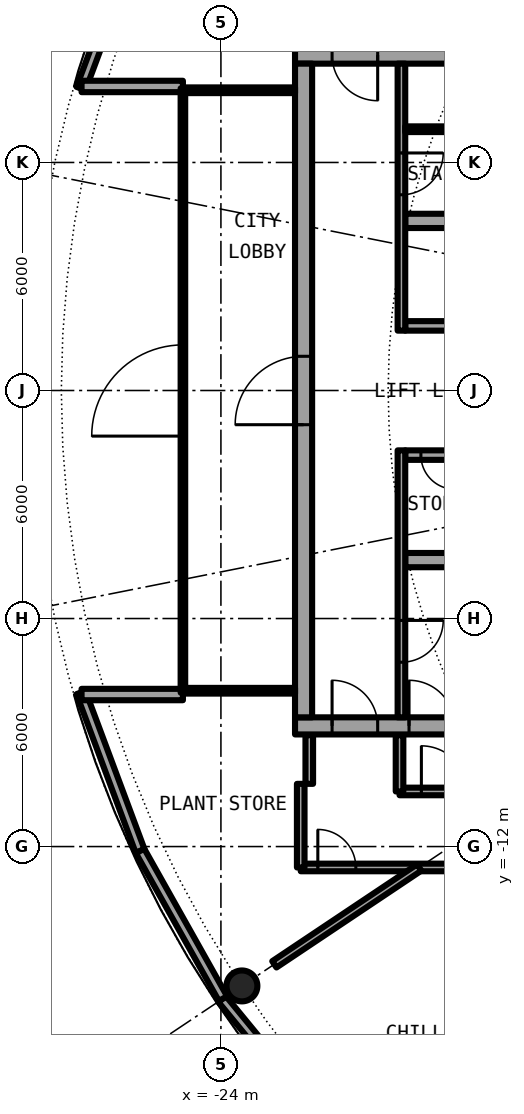
"""IFC4 building model, lengths in metres.
Left out: names, types, materials, properties, quantities, classifications, styles, units other than length and angle.
Written with IfcOpenShell. Run it as: python <this file> out.ifc"""

import sys

from ifc_helpers import new_model, si_unit, direction, frame, frame_2d, origin, origin_2d, place, context, subcontext, project, spatial, rectangle, hollow_circle, extrude, element, fill, save


model = new_model("IFC4")
c1 = context("Model", 3, precision=1e-05, world=origin(), true_north=direction((0.0, 1.0)))
c2 = subcontext(c1, "Body", "Model", "MODEL_VIEW")
j1 = project(units=[si_unit("LENGTHUNIT", "METRE"), si_unit("PLANEANGLEUNIT", "RADIAN")], contexts=[c1])
p1 = place(None, origin())
s1 = spatial("IfcSite", under=j1, at=p1, CompositionType="ELEMENT")
p2 = place(p1, origin())
s2 = spatial("IfcBuilding", under=s1, at=p2, CompositionType="ELEMENT")
p3 = place(p2, frame((0.0, 0.0, 186.0)))
s3 = spatial("IfcBuildingStorey", under=s2, at=p3, CompositionType="ELEMENT", Elevation=186.0)
p4 = place(p3, frame((-23.448, -15.667, 0.0), z_axis=(0.0, 0.0, 1.0), x_axis=(1.0, 0.0, 0.0)))
e1 = element("IfcColumn", 1, at=p4, inside=s3, PredefinedType="COLUMN", context=c2, shape_type="SweptSolid", body=[
    extrude(hollow_circle(Radius=0.406, WallThickness=0.03, at=origin_2d()), origin(), (0.0, 0.0, 1.0), 4.2),
])
p5 = place(p3, frame((-23.967, -16.014, 0.0), z_axis=(0.0, 0.0, 1.0), x_axis=(0.634403999748, -0.773001659186, 0.0)))
e2 = element("IfcWall", 2, at=p5, inside=s3, PredefinedType="SOLIDWALL", context=c2, shape_type="SweptSolid", body=[
    extrude(rectangle(XDim=5.651, YDim=0.25, at=frame_2d((2.825, 0.0))), origin(), (0.0, 0.0, 1.0), 3.85),
])
p6 = place(p3, frame((-27.682, -7.945, 0.0), z_axis=(0.0, 0.0, 1.0), x_axis=(0.349247811493, -0.937030397675, 0.0)))
e3 = element("IfcWall", 3, at=p6, inside=s3, PredefinedType="SOLIDWALL", context=c2, shape_type="SweptSolid", body=[
    extrude(rectangle(XDim=4.452, YDim=0.25, at=frame_2d((2.226, 0.0))), origin(), (0.0, 0.0, 1.0), 3.85),
])
p7 = place(p3, frame((-26.127, -12.117, 0.0), z_axis=(0.0, 0.0, 1.0), x_axis=(0.489696356642, -0.871893042919, 0.0)))
e4 = element("IfcWall", 4, at=p7, inside=s3, PredefinedType="SOLIDWALL", context=c2, shape_type="SweptSolid", body=[
    extrude(rectangle(XDim=4.454, YDim=0.25, at=frame_2d((2.227, 0.0))), origin(), (0.0, 0.0, 1.0), 3.85),
])
p8 = place(p3, frame((-26.127, 12.117, 0.0), z_axis=(0.0, 0.0, 1.0), x_axis=(-0.349247811493, -0.937030397675, 0.0)))
e5 = element("IfcWall", 5, at=p8, inside=s3, PredefinedType="SOLIDWALL", context=c2, shape_type="SweptSolid", body=[
    extrude(rectangle(XDim=4.452, YDim=0.25, at=frame_2d((2.226, 0.0))), origin(), (0.0, 0.0, 1.0), 3.85),
])
for number, where, z_axis, x_axis in (
    (6, (-25.0, 8.0, 0.0), (0.0, 0.0, 1.0), (-1.0, 0.0, 0.0)),
    (7, (-25.0, -8.0, 0.0), (0.0, 0.0, 1.0), (-1.0, 0.0, 0.0)),
):
    element("IfcWall", number, at=place(p3, frame(where, z_axis=z_axis, x_axis=x_axis)), inside=s3, PredefinedType="SOLIDWALL", context=c2, shape_type="SweptSolid", body=[
        extrude(rectangle(XDim=2.667, YDim=0.3, at=frame_2d((1.333, 0.0))), origin(), (0.0, 0.0, 1.0), 3.85),
    ])
p9 = place(p3, frame((-22.05, -8.825, 0.0), z_axis=(0.0, 0.0, 1.0), x_axis=(1.0, 0.0, 0.0)))
e8 = element("IfcWall", 8, at=p9, inside=s3, PredefinedType="SHEAR", context=c2, shape_type="SweptSolid", body=[
    extrude(rectangle(XDim=13.5, YDim=0.45, at=frame_2d((6.75, 0.0))), origin(), (0.0, 0.0, 1.0), 4.2),
])
p10 = place(p9, frame((0.975, 0.0, 0.0)))
e9 = element("IfcOpeningElement", 9, at=p10, cuts=e8, PredefinedType="OPENING", context=c2, shape_type="SweptSolid", body=[
    extrude(rectangle(XDim=1.2, YDim=2.3, at=frame_2d((0.6, 1.15))), frame((0.0, 0.235, 0.0), z_axis=(0.0, -1.0, 0.0), x_axis=(1.0, 0.0, 0.0)), (0.0, 0.0, 1.0), 0.47),
])
p11 = place(p9, frame((3.0, 0.0, 0.0)))
e10 = element("IfcOpeningElement", 10, at=p11, cuts=e8, PredefinedType="OPENING", context=c2, shape_type="SweptSolid", body=[
    extrude(rectangle(XDim=1.2, YDim=2.3, at=frame_2d((0.6, 1.15))), frame((0.0, 0.235, 0.0), z_axis=(0.0, -1.0, 0.0), x_axis=(1.0, 0.0, 0.0)), (0.0, 0.0, 1.0), 0.47),
])
p12 = place(p3, frame((-8.55, 8.825, 0.0), z_axis=(0.0, 0.0, 1.0), x_axis=(-1.0, 0.0, 0.0)))
e11 = element("IfcWall", 11, at=p12, inside=s3, PredefinedType="SHEAR", context=c2, shape_type="SweptSolid", body=[
    extrude(rectangle(XDim=13.5, YDim=0.45, at=frame_2d((6.75, 0.0))), origin(), (0.0, 0.0, 1.0), 4.2),
])
p13 = place(p12, frame((11.325, 0.0, 0.0)))
e12 = element("IfcOpeningElement", 12, at=p13, cuts=e11, PredefinedType="OPENING", context=c2, shape_type="SweptSolid", body=[
    extrude(rectangle(XDim=1.2, YDim=2.3, at=frame_2d((0.6, 1.15))), frame((0.0, 0.235, 0.0), z_axis=(0.0, -1.0, 0.0), x_axis=(1.0, 0.0, 0.0)), (0.0, 0.0, 1.0), 0.47),
])
p14 = place(p3, frame((-21.825, -8.6, 0.0), z_axis=(0.0, 0.0, 1.0), x_axis=(0.0, 1.0, 0.0)))
e13 = element("IfcWall", 13, at=p14, inside=s3, PredefinedType="SHEAR", context=c2, shape_type="SweptSolid", body=[
    extrude(rectangle(XDim=17.2, YDim=0.45, at=frame_2d((8.6, 0.0))), origin(), (0.0, 0.0, 1.0), 4.2),
])
p15 = place(p14, frame((7.7, 0.0, 0.0)))
e14 = element("IfcOpeningElement", 14, at=p15, cuts=e13, PredefinedType="OPENING", context=c2, shape_type="SweptSolid", body=[
    extrude(rectangle(XDim=1.8, YDim=2.3, at=frame_2d((0.9, 1.15))), frame((0.0, 0.235, 0.0), z_axis=(0.0, -1.0, 0.0), x_axis=(1.0, 0.0, 0.0)), (0.0, 0.0, 1.0), 0.47),
])
p16 = place(p3, frame((-9.0, -1.7, 0.0), z_axis=(0.0, 0.0, 1.0), x_axis=(-1.0, 0.0, 0.0)))
e15 = element("IfcWall", 15, at=p16, inside=s3, PredefinedType="SHEAR", context=c2, shape_type="SweptSolid", body=[
    extrude(rectangle(XDim=10.15, YDim=0.25, at=frame_2d((5.075, 0.0))), origin(), (0.0, 0.0, 1.0), 4.2),
])
p17 = place(p16, frame((0.212, 0.0, 0.0)))
e16 = element("IfcOpeningElement", 16, at=p17, cuts=e15, PredefinedType="OPENING", context=c2, shape_type="SweptSolid", body=[
    extrude(rectangle(XDim=0.9, YDim=2.3, at=frame_2d((0.45, 1.15))), frame((0.0, 0.135, 0.0), z_axis=(0.0, -1.0, 0.0), x_axis=(1.0, 0.0, 0.0)), (0.0, 0.0, 1.0), 0.27),
])
p18 = place(p16, frame((3.225, 0.0, 0.0)))
e17 = element("IfcOpeningElement", 17, at=p18, cuts=e15, PredefinedType="OPENING", context=c2, shape_type="SweptSolid", body=[
    extrude(rectangle(XDim=0.9, YDim=2.3, at=frame_2d((0.45, 1.15))), frame((0.0, 0.135, 0.0), z_axis=(0.0, -1.0, 0.0), x_axis=(1.0, 0.0, 0.0)), (0.0, 0.0, 1.0), 0.27),
])
p19 = place(p16, frame((8.837, 0.0, 0.0)))
e18 = element("IfcOpeningElement", 18, at=p19, cuts=e15, PredefinedType="OPENING", context=c2, shape_type="SweptSolid", body=[
    extrude(rectangle(XDim=0.9, YDim=2.3, at=frame_2d((0.45, 1.15))), frame((0.0, 0.135, 0.0), z_axis=(0.0, -1.0, 0.0), x_axis=(1.0, 0.0, 0.0)), (0.0, 0.0, 1.0), 0.27),
])
p20 = place(p3, frame((-9.0, -4.462, 0.0), z_axis=(0.0, 0.0, 1.0), x_axis=(-1.0, 0.0, 0.0)))
e19 = element("IfcWall", 19, at=p20, inside=s3, PredefinedType="SHEAR", context=c2, shape_type="SweptSolid", body=[
    extrude(rectangle(XDim=10.15, YDim=0.375, at=frame_2d((5.075, 0.0))), origin(), (0.0, 0.0, 1.0), 4.2),
])
p21 = place(p20, frame((6.6, 0.0, 0.0)))
e20 = element("IfcOpeningElement", 20, at=p21, cuts=e19, PredefinedType="OPENING", context=c2, shape_type="SweptSolid", body=[
    extrude(rectangle(XDim=1.1, YDim=2.3, at=frame_2d((0.55, 1.15))), frame((0.0, 0.198, 0.0), z_axis=(0.0, -1.0, 0.0), x_axis=(1.0, 0.0, 0.0)), (0.0, 0.0, 1.0), 0.395),
])
p22 = place(p3, frame((-19.25, -1.575, 0.0), z_axis=(0.0, 0.0, 1.0), x_axis=(0.0, -1.0, 0.0)))
e21 = element("IfcWall", 21, at=p22, inside=s3, PredefinedType="SOLIDWALL", context=c2, shape_type="SweptSolid", body=[
    extrude(rectangle(XDim=7.025, YDim=0.2, at=frame_2d((3.513, 0.0))), origin(), (0.0, 0.0, 1.0), 3.85),
])
p23 = place(p22, frame((4.475, 0.0, 0.0)))
e22 = element("IfcOpeningElement", 22, at=p23, cuts=e21, PredefinedType="OPENING", context=c2, shape_type="SweptSolid", body=[
    extrude(rectangle(XDim=1.1, YDim=2.3, at=frame_2d((0.55, 1.15))), frame((0.0, 0.11, 0.0), z_axis=(0.0, -1.0, 0.0), x_axis=(1.0, 0.0, 0.0)), (0.0, 0.0, 1.0), 0.22),
])
p24 = place(p3, frame((-9.0, 1.7, 0.0), z_axis=(0.0, 0.0, 1.0), x_axis=(-1.0, 0.0, 0.0)))
e23 = element("IfcWall", 23, at=p24, inside=s3, PredefinedType="SHEAR", context=c2, shape_type="SweptSolid", body=[
    extrude(rectangle(XDim=10.15, YDim=0.25, at=frame_2d((5.075, 0.0))), origin(), (0.0, 0.0, 1.0), 4.2),
])
p25 = place(p24, frame((0.387, 0.0, 0.0)))
e24 = element("IfcOpeningElement", 24, at=p25, cuts=e23, PredefinedType="OPENING", context=c2, shape_type="SweptSolid", body=[
    extrude(rectangle(XDim=1.1, YDim=2.3, at=frame_2d((0.55, 1.15))), frame((0.0, 0.135, 0.0), z_axis=(0.0, -1.0, 0.0), x_axis=(1.0, 0.0, 0.0)), (0.0, 0.0, 1.0), 0.27),
])
p26 = place(p24, frame((2.45, 0.0, 0.0)))
e25 = element("IfcOpeningElement", 25, at=p26, cuts=e23, PredefinedType="OPENING", context=c2, shape_type="SweptSolid", body=[
    extrude(rectangle(XDim=1.1, YDim=2.3, at=frame_2d((0.55, 1.15))), frame((0.0, 0.135, 0.0), z_axis=(0.0, -1.0, 0.0), x_axis=(1.0, 0.0, 0.0)), (0.0, 0.0, 1.0), 0.27),
])
p27 = place(p24, frame((4.45, 0.0, 0.0)))
e26 = element("IfcOpeningElement", 26, at=p27, cuts=e23, PredefinedType="OPENING", context=c2, shape_type="SweptSolid", body=[
    extrude(rectangle(XDim=1.1, YDim=2.3, at=frame_2d((0.55, 1.15))), frame((0.0, 0.135, 0.0), z_axis=(0.0, -1.0, 0.0), x_axis=(1.0, 0.0, 0.0)), (0.0, 0.0, 1.0), 0.27),
])
p28 = place(p24, frame((6.6, 0.0, 0.0)))
e27 = element("IfcOpeningElement", 27, at=p28, cuts=e23, PredefinedType="OPENING", context=c2, shape_type="SweptSolid", body=[
    extrude(rectangle(XDim=1.1, YDim=2.3, at=frame_2d((0.55, 1.15))), frame((0.0, 0.135, 0.0), z_axis=(0.0, -1.0, 0.0), x_axis=(1.0, 0.0, 0.0)), (0.0, 0.0, 1.0), 0.27),
])
p29 = place(p3, frame((-9.0, 4.462, 0.0), z_axis=(0.0, 0.0, 1.0), x_axis=(-1.0, 0.0, 0.0)))
e28 = element("IfcWall", 28, at=p29, inside=s3, PredefinedType="SHEAR", context=c2, shape_type="SweptSolid", body=[
    extrude(rectangle(XDim=10.15, YDim=0.375, at=frame_2d((5.075, 0.0))), origin(), (0.0, 0.0, 1.0), 4.2),
])
p30 = place(p3, frame((-19.25, 8.6, 0.0), z_axis=(0.0, 0.0, 1.0), x_axis=(0.0, -1.0, 0.0)))
e29 = element("IfcWall", 29, at=p30, inside=s3, PredefinedType="SOLIDWALL", context=c2, shape_type="SweptSolid", body=[
    extrude(rectangle(XDim=7.025, YDim=0.2, at=frame_2d((3.513, 0.0))), origin(), (0.0, 0.0, 1.0), 3.85),
])
p31 = place(p30, frame((2.35, 0.0, 0.0)))
e30 = element("IfcOpeningElement", 30, at=p31, cuts=e29, PredefinedType="OPENING", context=c2, shape_type="SweptSolid", body=[
    extrude(rectangle(XDim=1.1, YDim=2.3, at=frame_2d((0.55, 1.15))), frame((0.0, 0.11, 0.0), z_axis=(0.0, -1.0, 0.0), x_axis=(1.0, 0.0, 0.0)), (0.0, 0.0, 1.0), 0.22),
])
p32 = place(p3, frame((-15.45, 6.875, 0.0), z_axis=(0.0, 0.0, 1.0), x_axis=(-1.0, 0.0, 0.0)))
e31 = element("IfcWall", 31, at=p32, inside=s3, PredefinedType="PARTITIONING", context=c2, shape_type="SweptSolid", body=[
    extrude(rectangle(XDim=3.7, YDim=0.15, at=frame_2d((1.85, 0.0))), origin(), (0.0, 0.0, 1.0), 3.85),
])
p33 = place(p32, frame((1.4, 0.0, 0.0)))
e32 = element("IfcOpeningElement", 32, at=p33, cuts=e31, PredefinedType="OPENING", context=c2, shape_type="SweptSolid", body=[
    extrude(rectangle(XDim=0.9, YDim=2.3, at=frame_2d((0.45, 1.15))), frame((0.0, 0.085, 0.0), z_axis=(0.0, -1.0, 0.0), x_axis=(1.0, 0.0, 0.0)), (0.0, 0.0, 1.0), 0.17),
])
for number, where, z_axis, x_axis in (
    (33, (-22.05, 7.9, 0.0), (0.0, 0.0, 1.0), (-1.0, 0.0, 0.0)),
    (34, (-22.05, -7.9, 0.0), (0.0, 0.0, 1.0), (-1.0, 0.0, 0.0)),
):
    element("IfcWall", number, at=place(p3, frame(where, z_axis=z_axis, x_axis=x_axis)), inside=s3, PredefinedType="PARTITIONING", context=c2, shape_type="SweptSolid", body=[
        extrude(rectangle(XDim=2.89, YDim=0.15, at=frame_2d((1.445, 0.0))), origin(), (0.0, 0.0, 1.0), 3.85),
    ])
p34 = place(p3, frame((-25.0, -7.95, 0.0), z_axis=(0.0, 0.0, 1.0), x_axis=(0.0, 1.0, 0.0)))
e35 = element("IfcWall", 35, at=p34, inside=s3, PredefinedType="PARTITIONING", context=c2, shape_type="SweptSolid", body=[
    extrude(rectangle(XDim=15.9, YDim=0.12, at=frame_2d((7.95, 0.0))), origin(), (0.0, 0.0, 1.0), 3.85),
])
p35 = place(p34, frame((6.75, 0.0, 0.0)))
e36 = element("IfcOpeningElement", 36, at=p35, cuts=e35, PredefinedType="OPENING", context=c2, shape_type="SweptSolid", body=[
    extrude(rectangle(XDim=2.4, YDim=2.3, at=frame_2d((1.2, 1.15))), frame((0.0, 0.07, 0.0), z_axis=(0.0, -1.0, 0.0), x_axis=(1.0, 0.0, 0.0)), (0.0, 0.0, 1.0), 0.14),
])
p36 = place(p34, frame((11.55, 0.0, 0.1)))
e37 = element("IfcOpeningElement", 37, at=p36, cuts=e35, PredefinedType="OPENING", context=c2, shape_type="SweptSolid", body=[
    extrude(rectangle(XDim=3.4, YDim=3.5, at=frame_2d((1.7, 1.75))), frame((0.0, 0.07, 0.0), z_axis=(0.0, -1.0, 0.0), x_axis=(1.0, 0.0, 0.0)), (0.0, 0.0, 1.0), 0.14),
])
p37 = place(p34, frame((0.95, 0.0, 0.1)))
e38 = element("IfcOpeningElement", 38, at=p37, cuts=e35, PredefinedType="OPENING", context=c2, shape_type="SweptSolid", body=[
    extrude(rectangle(XDim=3.4, YDim=3.5, at=frame_2d((1.7, 1.75))), frame((0.0, 0.07, 0.0), z_axis=(0.0, -1.0, 0.0), x_axis=(1.0, 0.0, 0.0)), (0.0, 0.0, 1.0), 0.14),
])
p38 = place(p3, frame((-21.9, -12.55, 0.0), z_axis=(0.0, 0.0, 1.0), x_axis=(1.0, 0.0, 0.0)))
e39 = element("IfcWall", 39, at=p38, inside=s3, PredefinedType="PARTITIONING", context=c2, shape_type="SweptSolid", body=[
    extrude(rectangle(XDim=7.035, YDim=0.2, at=frame_2d((3.518, 0.0))), origin(), (0.0, 0.0, 1.0), 3.85),
])
p39 = place(p38, frame((0.45, 0.0, 0.0)))
e40 = element("IfcOpeningElement", 40, at=p39, cuts=e39, PredefinedType="OPENING", context=c2, shape_type="SweptSolid", body=[
    extrude(rectangle(XDim=1.0, YDim=2.3, at=frame_2d((0.5, 1.15))), frame((0.0, 0.11, 0.0), z_axis=(0.0, -1.0, 0.0), x_axis=(1.0, 0.0, 0.0)), (0.0, 0.0, 1.0), 0.22),
])
p40 = place(p3, frame((-19.3, -10.55, 0.0), z_axis=(0.0, 0.0, 1.0), x_axis=(1.0, 0.0, 0.0)))
e41 = element("IfcWall", 41, at=p40, inside=s3, PredefinedType="PARTITIONING", context=c2, shape_type="SweptSolid", body=[
    extrude(rectangle(XDim=2.35, YDim=0.2, at=frame_2d((1.175, 0.0))), origin(), (0.0, 0.0, 1.0), 3.85),
])
p41 = place(p40, frame((0.575, 0.0, 0.0)))
e42 = element("IfcOpeningElement", 42, at=p41, cuts=e41, PredefinedType="OPENING", context=c2, shape_type="SweptSolid", body=[
    extrude(rectangle(XDim=1.2, YDim=2.3, at=frame_2d((0.6, 1.15))), frame((0.0, 0.11, 0.0), z_axis=(0.0, -1.0, 0.0), x_axis=(1.0, 0.0, 0.0)), (0.0, 0.0, 1.0), 0.22),
])
p42 = place(p3, frame((-22.594, -15.099, 0.0), z_axis=(0.0, 0.0, 1.0), x_axis=(0.831435525834, 0.555621243637, 0.0)))
e43 = element("IfcWall", 43, at=p42, inside=s3, PredefinedType="PARTITIONING", context=c2, shape_type="SweptSolid", body=[
    extrude(rectangle(XDim=4.586, YDim=0.2, at=frame_2d((2.293, 0.0))), origin(), (0.0, 0.0, 1.0), 3.85),
])
p43 = place(p3, frame((-19.3, -10.55, 0.0), z_axis=(0.0, 0.0, 1.0), x_axis=(0.0, 1.0, 0.0)))
e44 = element("IfcWall", 44, at=p43, inside=s3, PredefinedType="PARTITIONING", context=c2, shape_type="SweptSolid", body=[
    extrude(rectangle(XDim=1.48, YDim=0.2, at=frame_2d((0.74, 0.0))), origin(), (0.0, 0.0, 1.0), 3.85),
])
p44 = place(p3, frame((-21.675, -10.35, 0.0), z_axis=(0.0, 0.0, 1.0), x_axis=(0.0, 1.0, 0.0)))
e45 = element("IfcWall", 45, at=p44, inside=s3, PredefinedType="PARTITIONING", context=c2, shape_type="SweptSolid", body=[
    extrude(rectangle(XDim=1.28, YDim=0.2, at=frame_2d((0.64, 0.0))), origin(), (0.0, 0.0, 1.0), 3.85),
])
p45 = place(p3, frame((-21.9, -12.55, 0.0), z_axis=(0.0, 0.0, 1.0), x_axis=(0.0, 1.0, 0.0)))
e46 = element("IfcWall", 46, at=p45, inside=s3, PredefinedType="PARTITIONING", context=c2, shape_type="SweptSolid", body=[
    extrude(rectangle(XDim=2.2, YDim=0.2, at=frame_2d((1.1, 0.0))), origin(), (0.0, 0.0, 1.0), 3.85),
])
p46 = place(p19, origin())
e47 = element("IfcDoor", 47, at=p46, inside=s3, OperationType="SINGLE_SWING_LEFT", PredefinedType="DOOR", context=c2, shape_type="SweptSolid", body=[
    extrude(rectangle(XDim=0.9, YDim=2.3, at=frame_2d((0.45, 1.15))), frame((0.0, 0.025, 0.0), z_axis=(0.0, -1.0, 0.0), x_axis=(1.0, 0.0, 0.0)), (0.0, 0.0, 1.0), 0.05),
])
fill(e18, e47)
p47 = place(p23, origin())
e48 = element("IfcDoor", 48, at=p47, inside=s3, OperationType="SINGLE_SWING_LEFT", PredefinedType="DOOR", context=c2, shape_type="SweptSolid", body=[
    extrude(rectangle(XDim=1.1, YDim=2.3, at=frame_2d((0.55, 1.15))), frame((0.0, 0.025, 0.0), z_axis=(0.0, -1.0, 0.0), x_axis=(1.0, 0.0, 0.0)), (0.0, 0.0, 1.0), 0.05),
])
fill(e22, e48)
p48 = place(p31, origin())
e49 = element("IfcDoor", 49, at=p48, inside=s3, OperationType="SINGLE_SWING_RIGHT", PredefinedType="DOOR", context=c2, shape_type="SweptSolid", body=[
    extrude(rectangle(XDim=1.1, YDim=2.3, at=frame_2d((0.55, 1.15))), frame((0.0, 0.025, 0.0), z_axis=(0.0, -1.0, 0.0), x_axis=(1.0, 0.0, 0.0)), (0.0, 0.0, 1.0), 0.05),
])
fill(e30, e49)
p49 = place(p10, origin())
e50 = element("IfcDoor", 50, at=p49, inside=s3, OperationType="SINGLE_SWING_RIGHT", PredefinedType="DOOR", context=c2, shape_type="SweptSolid", body=[
    extrude(rectangle(XDim=1.2, YDim=2.3, at=frame_2d((0.6, 1.15))), frame((0.0, 0.025, 0.0), z_axis=(0.0, -1.0, 0.0), x_axis=(1.0, 0.0, 0.0)), (0.0, 0.0, 1.0), 0.05),
])
fill(e9, e50)
p50 = place(p13, origin())
e51 = element("IfcDoor", 51, at=p50, inside=s3, OperationType="SINGLE_SWING_LEFT", PredefinedType="DOOR", context=c2, shape_type="SweptSolid", body=[
    extrude(rectangle(XDim=1.2, YDim=2.3, at=frame_2d((0.6, 1.15))), frame((0.0, 0.025, 0.0), z_axis=(0.0, -1.0, 0.0), x_axis=(1.0, 0.0, 0.0)), (0.0, 0.0, 1.0), 0.05),
])
fill(e12, e51)
p51 = place(p11, origin())
e52 = element("IfcDoor", 52, at=p51, inside=s3, OperationType="SINGLE_SWING_RIGHT", PredefinedType="DOOR", context=c2, shape_type="SweptSolid", body=[
    extrude(rectangle(XDim=1.2, YDim=2.3, at=frame_2d((0.6, 1.15))), frame((0.0, 0.025, 0.0), z_axis=(0.0, -1.0, 0.0), x_axis=(1.0, 0.0, 0.0)), (0.0, 0.0, 1.0), 0.05),
])
fill(e10, e52)
p52 = place(p15, origin())
e53 = element("IfcDoor", 53, at=p52, inside=s3, OperationType="SINGLE_SWING_LEFT", PredefinedType="DOOR", context=c2, shape_type="SweptSolid", body=[
    extrude(rectangle(XDim=1.8, YDim=2.3, at=frame_2d((0.9, 1.15))), frame((0.0, 0.025, 0.0), z_axis=(0.0, -1.0, 0.0), x_axis=(1.0, 0.0, 0.0)), (0.0, 0.0, 1.0), 0.05),
])
fill(e14, e53)
p53 = place(p35, origin())
e54 = element("IfcDoor", 54, at=p53, inside=s3, OperationType="SINGLE_SWING_LEFT", PredefinedType="DOOR", context=c2, shape_type="SweptSolid", body=[
    extrude(rectangle(XDim=2.4, YDim=2.3, at=frame_2d((1.2, 1.15))), frame((0.0, 0.025, 0.0), z_axis=(0.0, -1.0, 0.0), x_axis=(1.0, 0.0, 0.0)), (0.0, 0.0, 1.0), 0.05),
])
fill(e36, e54)
p54 = place(p36, origin())
e55 = element("IfcWindow", 55, at=p54, inside=s3, PartitioningType="SINGLE_PANEL", PredefinedType="WINDOW", context=c2, shape_type="SweptSolid", body=[
    extrude(rectangle(XDim=3.4, YDim=3.5, at=frame_2d((1.7, 1.75))), frame((0.0, 0.03, 0.0), z_axis=(0.0, -1.0, 0.0), x_axis=(1.0, 0.0, 0.0)), (0.0, 0.0, 1.0), 0.06),
])
fill(e37, e55)
p55 = place(p37, origin())
e56 = element("IfcWindow", 56, at=p55, inside=s3, PartitioningType="SINGLE_PANEL", PredefinedType="WINDOW", context=c2, shape_type="SweptSolid", body=[
    extrude(rectangle(XDim=3.4, YDim=3.5, at=frame_2d((1.7, 1.75))), frame((0.0, 0.03, 0.0), z_axis=(0.0, -1.0, 0.0), x_axis=(1.0, 0.0, 0.0)), (0.0, 0.0, 1.0), 0.06),
])
fill(e38, e56)
p56 = place(p41, origin())
e57 = element("IfcDoor", 57, at=p56, inside=s3, OperationType="SINGLE_SWING_LEFT", PredefinedType="DOOR", context=c2, shape_type="SweptSolid", body=[
    extrude(rectangle(XDim=1.2, YDim=2.3, at=frame_2d((0.6, 1.15))), frame((0.0, 0.025, 0.0), z_axis=(0.0, -1.0, 0.0), x_axis=(1.0, 0.0, 0.0)), (0.0, 0.0, 1.0), 0.05),
])
fill(e42, e57)
p57 = place(p39, origin())
e58 = element("IfcDoor", 58, at=p57, inside=s3, OperationType="SINGLE_SWING_LEFT", PredefinedType="DOOR", context=c2, shape_type="SweptSolid", body=[
    extrude(rectangle(XDim=1.0, YDim=2.3, at=frame_2d((0.5, 1.15))), frame((0.0, 0.025, 0.0), z_axis=(0.0, -1.0, 0.0), x_axis=(1.0, 0.0, 0.0)), (0.0, 0.0, 1.0), 0.05),
])
fill(e40, e58)
save(model, sys.argv[1])
